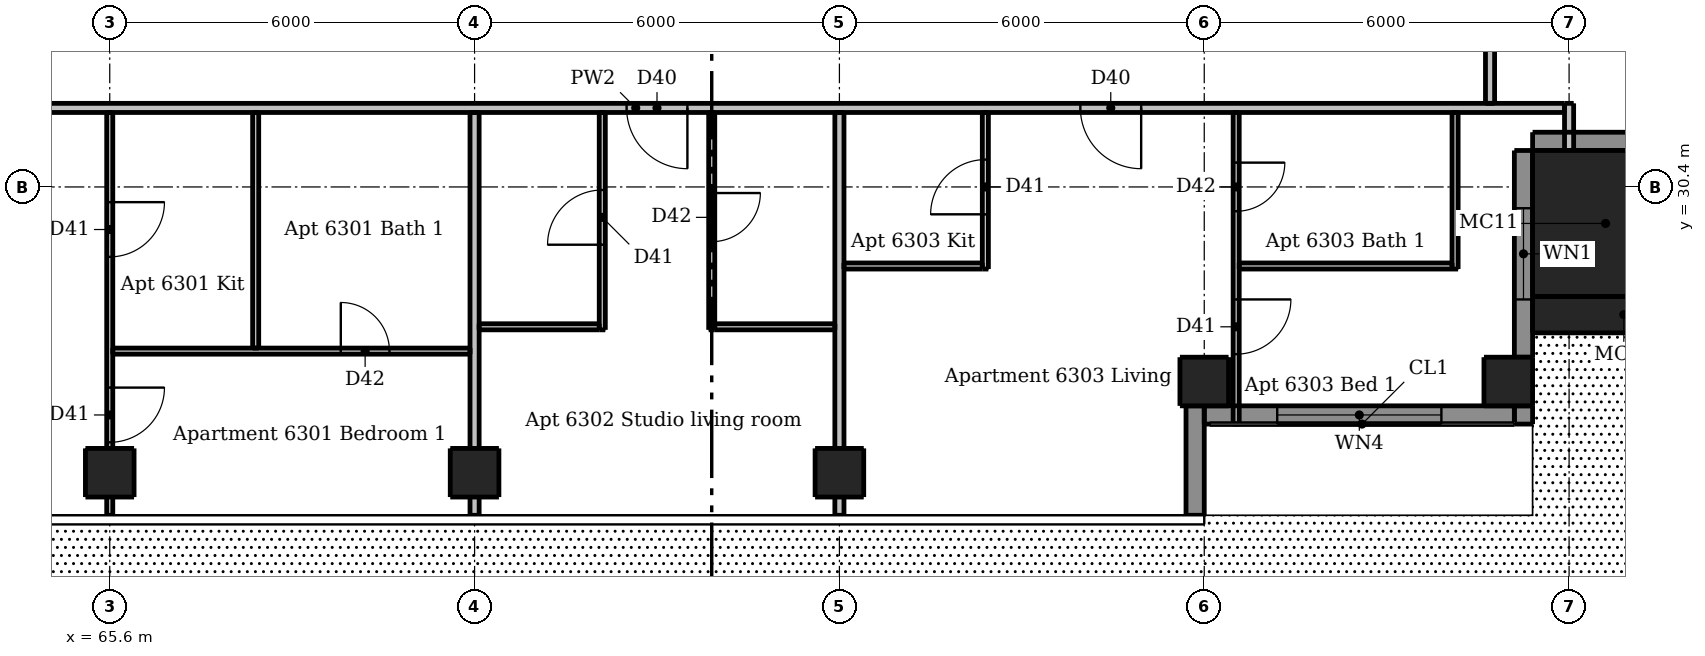
"""IFC4 building model, lengths in metres.
Left out: names, types, materials, properties, quantities, classifications, styles, units other than length and angle.
Written with IfcOpenShell. Run it as: python <this file> out.ifc"""

import sys

from ifc_helpers import new_model, si_unit, direction, frame, frame_2d, origin, origin_2d, place, context, subcontext, project, spatial, rectangle, extrude, element, fill, save


model = new_model("IFC4")
c1 = context("Model", 3, precision=1e-05, world=origin(), true_north=direction((0.0, 1.0)))
c2 = subcontext(c1, "Body", "Model", "MODEL_VIEW")
j1 = project(units=[si_unit("LENGTHUNIT", "METRE"), si_unit("PLANEANGLEUNIT", "RADIAN")], contexts=[c1])
p1 = place(None, origin())
s1 = spatial("IfcSite", under=j1, at=p1, CompositionType="ELEMENT")
p2 = place(p1, origin())
s2 = spatial("IfcBuilding", under=s1, at=p2, CompositionType="ELEMENT")
p3 = place(p2, frame((0.0, 0.0, 238.9)))
s3 = spatial("IfcBuildingStorey", under=s2, at=p3, CompositionType="ELEMENT", Elevation=238.9)
for number, where, z_axis, x_axis in (
    (1, (65.6, 25.7, 0.0), (0.0, 0.0, 1.0), (1.0, 0.0, 0.0)),
    (2, (71.6, 25.7, 0.0), (0.0, 0.0, 1.0), (1.0, 0.0, 0.0)),
    (3, (77.6, 25.7, 0.0), (0.0, 0.0, 1.0), (1.0, 0.0, 0.0)),
    (4, (83.6, 27.2, 0.0), (0.0, 0.0, 1.0), (1.0, 0.0, 0.0)),
    (5, (88.6, 27.2, 0.0), (0.0, 0.0, 1.0), (1.0, 0.0, 0.0)),
):
    element("IfcColumn", number, at=place(p3, frame(where, z_axis=z_axis, x_axis=x_axis)), inside=s3, PredefinedType="COLUMN", context=c2, shape_type="SweptSolid", body=[
        extrude(rectangle(XDim=0.8, YDim=0.8, at=origin_2d()), origin(), (0.0, 0.0, 1.0), 3.05),
    ])
p4 = place(p3, frame((90.5, 28.3, 0.0), z_axis=(0.0, 0.0, 1.0), x_axis=(1.0, 0.0, 0.0)))
e6 = element("IfcColumn", 6, at=p4, inside=s3, PredefinedType="COLUMN", context=c2, shape_type="SweptSolid", body=[
    extrude(rectangle(XDim=3.0, YDim=0.6, at=origin_2d()), origin(), (0.0, 0.0, 1.0), 2.4),
])
p5 = place(p3, frame((90.2, 29.8, 0.0), z_axis=(0.0, 0.0, 1.0), x_axis=(1.0, 0.0, 0.0)))
e7 = element("IfcColumn", 7, at=p5, inside=s3, PredefinedType="COLUMN", context=c2, shape_type="SweptSolid", body=[
    extrude(rectangle(XDim=2.4, YDim=2.4, at=origin_2d()), origin(), (0.0, 0.0, 1.0), 3.3),
])
p6 = place(p3, frame((83.45, 25.0, 0.0), z_axis=(0.0, 0.0, 1.0), x_axis=(0.0, 1.0, 0.0)))
e8 = element("IfcWall", 8, at=p6, inside=s3, PredefinedType="SOLIDWALL", context=c2, shape_type="SweptSolid", body=[
    extrude(rectangle(XDim=1.8, YDim=0.3, at=frame_2d((0.9, 0.0))), origin(), (0.0, 0.0, 1.0), 3.05),
])
p7 = place(p3, frame((88.85, 26.5, 0.0), z_axis=(0.0, 0.0, 1.0), x_axis=(0.0, 1.0, 0.0)))
e9 = element("IfcWall", 9, at=p7, inside=s3, PredefinedType="SOLIDWALL", context=c2, shape_type="SweptSolid", body=[
    extrude(rectangle(XDim=0.3, YDim=0.3, at=frame_2d((0.15, 0.0))), origin(), (0.0, 0.0, 1.0), 3.05),
])
p8 = place(p3, frame((88.85, 27.6, 0.0), z_axis=(0.0, 0.0, 1.0), x_axis=(0.0, 1.0, 0.0)))
e10 = element("IfcWall", 10, at=p8, inside=s3, PredefinedType="SOLIDWALL", context=c2, shape_type="SweptSolid", body=[
    extrude(rectangle(XDim=3.4, YDim=0.3, at=frame_2d((1.7, 0.0))), origin(), (0.0, 0.0, 1.0), 3.05),
])
p9 = place(p8, frame((0.95, 0.0, 0.9)))
e11 = element("IfcOpeningElement", 11, at=p9, cuts=e10, PredefinedType="OPENING", context=c2, shape_type="SweptSolid", body=[
    extrude(rectangle(XDim=1.5, YDim=1.5, at=frame_2d((0.75, 0.75))), frame((0.0, 0.16, 0.0), z_axis=(0.0, -1.0, 0.0), x_axis=(1.0, 0.0, 0.0)), (0.0, 0.0, 1.0), 0.32),
])
p10 = place(p3, frame((89.0, 31.15, 0.0), z_axis=(0.0, 0.0, 1.0), x_axis=(1.0, 0.0, 0.0)))
e12 = element("IfcWall", 12, at=p10, inside=s3, PredefinedType="SOLIDWALL", context=c2, shape_type="SweptSolid", body=[
    extrude(rectangle(XDim=3.4, YDim=0.3, at=frame_2d((1.7, 0.0))), origin(), (0.0, 0.0, 1.0), 3.05),
])
p11 = place(p3, frame((83.6, 26.65, 0.0), z_axis=(0.0, 0.0, 1.0), x_axis=(1.0, 0.0, 0.0)))
e13 = element("IfcWall", 13, at=p11, inside=s3, PredefinedType="SOLIDWALL", context=c2, shape_type="SweptSolid", body=[
    extrude(rectangle(XDim=5.1, YDim=0.3, at=frame_2d((2.55, 0.0))), origin(), (0.0, 0.0, 1.0), 3.05),
])
p12 = place(p11, frame((1.2, 0.0, 0.15)))
e14 = element("IfcOpeningElement", 14, at=p12, cuts=e13, PredefinedType="OPENING", context=c2, shape_type="SweptSolid", body=[
    extrude(rectangle(XDim=2.7, YDim=2.1, at=frame_2d((1.35, 1.05))), frame((0.0, 0.16, 0.0), z_axis=(0.0, -1.0, 0.0), x_axis=(1.0, 0.0, 0.0)), (0.0, 0.0, 1.0), 0.32),
])
p13 = place(p3, frame((65.6, 31.625, 0.0), z_axis=(0.0, 0.0, 1.0), x_axis=(0.0, -1.0, 0.0)))
e15 = element("IfcWall", 15, at=p13, inside=s3, PredefinedType="PARTITIONING", context=c2, shape_type="SweptSolid", body=[
    extrude(rectangle(XDim=6.625, YDim=0.1, at=frame_2d((3.312, 0.0))), origin(), (0.0, 0.0, 1.0), 2.59),
])
p14 = place(p13, frame((1.475, 0.0, 0.0)))
e16 = element("IfcOpeningElement", 16, at=p14, cuts=e15, PredefinedType="OPENING", context=c2, shape_type="SweptSolid", body=[
    extrude(rectangle(XDim=0.9, YDim=2.1, at=frame_2d((0.45, 1.05))), frame((0.0, 0.06, 0.0), z_axis=(0.0, -1.0, 0.0), x_axis=(1.0, 0.0, 0.0)), (0.0, 0.0, 1.0), 0.12),
])
p15 = place(p13, frame((4.525, 0.0, 0.0)))
e17 = element("IfcOpeningElement", 17, at=p15, cuts=e15, PredefinedType="OPENING", context=c2, shape_type="SweptSolid", body=[
    extrude(rectangle(XDim=0.9, YDim=2.1, at=frame_2d((0.45, 1.05))), frame((0.0, 0.06, 0.0), z_axis=(0.0, -1.0, 0.0), x_axis=(1.0, 0.0, 0.0)), (0.0, 0.0, 1.0), 0.12),
])
p16 = place(p3, frame((68.0, 27.75, 0.0), z_axis=(0.0, 0.0, 1.0), x_axis=(0.0, 1.0, 0.0)))
e18 = element("IfcWall", 18, at=p16, inside=s3, PredefinedType="PARTITIONING", context=c2, shape_type="SweptSolid", body=[
    extrude(rectangle(XDim=3.875, YDim=0.1, at=frame_2d((1.938, 0.0))), origin(), (0.0, 0.0, 1.0), 3.05),
])
p17 = place(p3, frame((73.7, 28.05, 0.0), z_axis=(0.0, 0.0, 1.0), x_axis=(0.0, 1.0, 0.0)))
e19 = element("IfcWall", 19, at=p17, inside=s3, PredefinedType="PARTITIONING", context=c2, shape_type="SweptSolid", body=[
    extrude(rectangle(XDim=3.575, YDim=0.1, at=frame_2d((1.788, 0.0))), origin(), (0.0, 0.0, 1.0), 3.05),
])
p18 = place(p17, frame((1.4, 0.0, 0.0)))
e20 = element("IfcOpeningElement", 20, at=p18, cuts=e19, PredefinedType="OPENING", context=c2, shape_type="SweptSolid", body=[
    extrude(rectangle(XDim=0.9, YDim=2.1, at=frame_2d((0.45, 1.05))), frame((0.0, 0.06, 0.0), z_axis=(0.0, -1.0, 0.0), x_axis=(1.0, 0.0, 0.0)), (0.0, 0.0, 1.0), 0.12),
])
p19 = place(p3, frame((75.5, 31.625, 0.0), z_axis=(0.0, 0.0, 1.0), x_axis=(0.0, -1.0, 0.0)))
e21 = element("IfcWall", 21, at=p19, inside=s3, PredefinedType="PARTITIONING", context=c2, shape_type="SweptSolid", body=[
    extrude(rectangle(XDim=3.575, YDim=0.1, at=frame_2d((1.788, 0.0))), origin(), (0.0, 0.0, 1.0), 3.05),
])
p20 = place(p19, frame((1.325, 0.0, 0.0)))
e22 = element("IfcOpeningElement", 22, at=p20, cuts=e21, PredefinedType="OPENING", context=c2, shape_type="SweptSolid", body=[
    extrude(rectangle(XDim=0.8, YDim=2.1, at=frame_2d((0.4, 1.05))), frame((0.0, 0.06, 0.0), z_axis=(0.0, -1.0, 0.0), x_axis=(1.0, 0.0, 0.0)), (0.0, 0.0, 1.0), 0.12),
])
p21 = place(p3, frame((80.0, 29.05, 0.0), z_axis=(0.0, 0.0, 1.0), x_axis=(0.0, 1.0, 0.0)))
e23 = element("IfcWall", 23, at=p21, inside=s3, PredefinedType="PARTITIONING", context=c2, shape_type="SweptSolid", body=[
    extrude(rectangle(XDim=2.575, YDim=0.1, at=frame_2d((1.288, 0.0))), origin(), (0.0, 0.0, 1.0), 3.05),
])
p22 = place(p21, frame((0.9, 0.0, 0.0)))
e24 = element("IfcOpeningElement", 24, at=p22, cuts=e23, PredefinedType="OPENING", context=c2, shape_type="SweptSolid", body=[
    extrude(rectangle(XDim=0.9, YDim=2.1, at=frame_2d((0.45, 1.05))), frame((0.0, 0.06, 0.0), z_axis=(0.0, -1.0, 0.0), x_axis=(1.0, 0.0, 0.0)), (0.0, 0.0, 1.0), 0.12),
])
p23 = place(p3, frame((84.125, 31.625, 0.0), z_axis=(0.0, 0.0, 1.0), x_axis=(0.0, -1.0, 0.0)))
e25 = element("IfcWall", 25, at=p23, inside=s3, PredefinedType="PARTITIONING", context=c2, shape_type="SweptSolid", body=[
    extrude(rectangle(XDim=5.125, YDim=0.1, at=frame_2d((2.562, 0.0))), origin(), (0.0, 0.0, 1.0), 3.05),
])
p24 = place(p23, frame((3.075, 0.0, 0.0)))
e26 = element("IfcOpeningElement", 26, at=p24, cuts=e25, PredefinedType="OPENING", context=c2, shape_type="SweptSolid", body=[
    extrude(rectangle(XDim=0.9, YDim=2.1, at=frame_2d((0.45, 1.05))), frame((0.0, 0.06, 0.0), z_axis=(0.0, -1.0, 0.0), x_axis=(1.0, 0.0, 0.0)), (0.0, 0.0, 1.0), 0.12),
])
p25 = place(p23, frame((0.825, 0.0, 0.0)))
e27 = element("IfcOpeningElement", 27, at=p25, cuts=e25, PredefinedType="OPENING", context=c2, shape_type="SweptSolid", body=[
    extrude(rectangle(XDim=0.8, YDim=2.1, at=frame_2d((0.4, 1.05))), frame((0.0, 0.06, 0.0), z_axis=(0.0, -1.0, 0.0), x_axis=(1.0, 0.0, 0.0)), (0.0, 0.0, 1.0), 0.12),
])
p26 = place(p3, frame((87.725, 29.05, 0.0), z_axis=(0.0, 0.0, 1.0), x_axis=(0.0, 1.0, 0.0)))
e28 = element("IfcWall", 28, at=p26, inside=s3, PredefinedType="PARTITIONING", context=c2, shape_type="SweptSolid", body=[
    extrude(rectangle(XDim=2.575, YDim=0.1, at=frame_2d((1.288, 0.0))), origin(), (0.0, 0.0, 1.0), 3.05),
])
p27 = place(p3, frame((77.675, 29.1, 0.0), z_axis=(0.0, 0.0, 1.0), x_axis=(1.0, 0.0, 0.0)))
e29 = element("IfcWall", 29, at=p27, inside=s3, PredefinedType="PARTITIONING", context=c2, shape_type="SweptSolid", body=[
    extrude(rectangle(XDim=2.275, YDim=0.1, at=frame_2d((1.137, 0.0))), origin(), (0.0, 0.0, 1.0), 3.05),
])
p28 = place(p3, frame((84.175, 29.1, 0.0), z_axis=(0.0, 0.0, 1.0), x_axis=(1.0, 0.0, 0.0)))
e30 = element("IfcWall", 30, at=p28, inside=s3, PredefinedType="PARTITIONING", context=c2, shape_type="SweptSolid", body=[
    extrude(rectangle(XDim=3.5, YDim=0.1, at=frame_2d((1.75, 0.0))), origin(), (0.0, 0.0, 1.0), 3.05),
])
for number, where, z_axis, x_axis in (
    (31, (71.675, 28.1, 0.0), (0.0, 0.0, 1.0), (1.0, 0.0, 0.0)),
    (32, (75.55, 28.1, 0.0), (0.0, 0.0, 1.0), (1.0, 0.0, 0.0)),
):
    element("IfcWall", number, at=place(p3, frame(where, z_axis=z_axis, x_axis=x_axis)), inside=s3, PredefinedType="PARTITIONING", context=c2, shape_type="SweptSolid", body=[
        extrude(rectangle(XDim=1.975, YDim=0.1, at=frame_2d((0.987, 0.0))), origin(), (0.0, 0.0, 1.0), 3.05),
    ])
p29 = place(p3, frame((65.65, 27.7, 0.0), z_axis=(0.0, 0.0, 1.0), x_axis=(1.0, 0.0, 0.0)))
e33 = element("IfcWall", 33, at=p29, inside=s3, PredefinedType="PARTITIONING", context=c2, shape_type="SweptSolid", body=[
    extrude(rectangle(XDim=5.875, YDim=0.1, at=frame_2d((2.938, 0.0))), origin(), (0.0, 0.0, 1.0), 3.05),
])
p30 = place(p29, frame((3.75, 0.0, 0.0)))
e34 = element("IfcOpeningElement", 34, at=p30, cuts=e33, PredefinedType="OPENING", context=c2, shape_type="SweptSolid", body=[
    extrude(rectangle(XDim=0.8, YDim=2.1, at=frame_2d((0.4, 1.05))), frame((0.0, 0.06, 0.0), z_axis=(0.0, -1.0, 0.0), x_axis=(1.0, 0.0, 0.0)), (0.0, 0.0, 1.0), 0.12),
])
for number, where, z_axis, x_axis in (
    (35, (71.6, 25.0, 0.0), (0.0, 0.0, 1.0), (0.0, 1.0, 0.0)),
    (36, (77.6, 25.0, 0.0), (0.0, 0.0, 1.0), (0.0, 1.0, 0.0)),
):
    element("IfcWall", number, at=place(p3, frame(where, z_axis=z_axis, x_axis=x_axis)), inside=s3, PredefinedType="PARTITIONING", context=c2, shape_type="SweptSolid", body=[
        extrude(rectangle(XDim=6.625, YDim=0.15, at=frame_2d((3.312, 0.0))), origin(), (0.0, 0.0, 1.0), 2.59),
    ])
p31 = place(p3, frame((88.3, 61.175, 0.0), z_axis=(0.0, 0.0, 1.0), x_axis=(0.0, -1.0, 0.0)))
e37 = element("IfcWall", 37, at=p31, inside=s3, PredefinedType="PARTITIONING", context=c2, shape_type="SweptSolid", body=[
    extrude(rectangle(XDim=29.4, YDim=0.15, at=frame_2d((14.7, 0.0))), origin(), (0.0, 0.0, 1.0), 3.05),
])
p32 = place(p31, frame((26.625, 0.0, 0.0)))
e38 = element("IfcOpeningElement", 38, at=p32, cuts=e37, PredefinedType="OPENING", context=c2, shape_type="SweptSolid", body=[
    extrude(rectangle(XDim=1.0, YDim=2.1, at=frame_2d((0.5, 1.05))), frame((0.0, 0.085, 0.0), z_axis=(0.0, -1.0, 0.0), x_axis=(1.0, 0.0, 0.0)), (0.0, 0.0, 1.0), 0.17),
])
p33 = place(p31, frame((15.275, 0.0, 0.0)))
e39 = element("IfcOpeningElement", 39, at=p33, cuts=e37, PredefinedType="OPENING", context=c2, shape_type="SweptSolid", body=[
    extrude(rectangle(XDim=1.0, YDim=2.1, at=frame_2d((0.5, 1.05))), frame((0.0, 0.085, 0.0), z_axis=(0.0, -1.0, 0.0), x_axis=(1.0, 0.0, 0.0)), (0.0, 0.0, 1.0), 0.17),
])
p34 = place(p31, frame((9.275, 0.0, 0.0)))
e40 = element("IfcOpeningElement", 40, at=p34, cuts=e37, PredefinedType="OPENING", context=c2, shape_type="SweptSolid", body=[
    extrude(rectangle(XDim=1.0, YDim=2.1, at=frame_2d((0.5, 1.05))), frame((0.0, 0.085, 0.0), z_axis=(0.0, -1.0, 0.0), x_axis=(1.0, 0.0, 0.0)), (0.0, 0.0, 1.0), 0.17),
])
p35 = place(p31, frame((3.275, 0.0, 0.0)))
e41 = element("IfcOpeningElement", 41, at=p35, cuts=e37, PredefinedType="OPENING", context=c2, shape_type="SweptSolid", body=[
    extrude(rectangle(XDim=1.0, YDim=2.1, at=frame_2d((0.5, 1.05))), frame((0.0, 0.085, 0.0), z_axis=(0.0, -1.0, 0.0), x_axis=(1.0, 0.0, 0.0)), (0.0, 0.0, 1.0), 0.17),
])
p36 = place(p3, frame((89.6, 31.0, 0.0), z_axis=(0.0, 0.0, 1.0), x_axis=(0.0, 1.0, 0.0)))
e42 = element("IfcWall", 42, at=p36, inside=s3, PredefinedType="PARTITIONING", context=c2, shape_type="SweptSolid", body=[
    extrude(rectangle(XDim=0.775, YDim=0.15, at=frame_2d((0.387, 0.0))), origin(), (0.0, 0.0, 1.0), 3.05),
])
p37 = place(p3, frame((89.525, 31.7, 0.0), z_axis=(0.0, 0.0, 1.0), x_axis=(-1.0, 0.0, 0.0)))
e43 = element("IfcWall", 43, at=p37, inside=s3, PredefinedType="PARTITIONING", context=c2, shape_type="SweptSolid", body=[
    extrude(rectangle(XDim=30.55, YDim=0.15, at=frame_2d((15.275, 0.0))), origin(), (0.0, 0.0, 1.0), 3.05),
])
p38 = place(p37, frame((26.775, 0.0, 0.0)))
e44 = element("IfcOpeningElement", 44, at=p38, cuts=e43, PredefinedType="OPENING", context=c2, shape_type="SweptSolid", body=[
    extrude(rectangle(XDim=1.0, YDim=2.1, at=frame_2d((0.5, 1.05))), frame((0.0, 0.085, 0.0), z_axis=(0.0, -1.0, 0.0), x_axis=(1.0, 0.0, 0.0)), (0.0, 0.0, 1.0), 0.17),
])
p39 = place(p37, frame((14.425, 0.0, 0.0)))
e45 = element("IfcOpeningElement", 45, at=p39, cuts=e43, PredefinedType="OPENING", context=c2, shape_type="SweptSolid", body=[
    extrude(rectangle(XDim=1.0, YDim=2.1, at=frame_2d((0.5, 1.05))), frame((0.0, 0.085, 0.0), z_axis=(0.0, -1.0, 0.0), x_axis=(1.0, 0.0, 0.0)), (0.0, 0.0, 1.0), 0.17),
])
p40 = place(p37, frame((6.962, 0.0, 0.0)))
e46 = element("IfcOpeningElement", 46, at=p40, cuts=e43, PredefinedType="OPENING", context=c2, shape_type="SweptSolid", body=[
    extrude(rectangle(XDim=1.0, YDim=2.1, at=frame_2d((0.5, 1.05))), frame((0.0, 0.085, 0.0), z_axis=(0.0, -1.0, 0.0), x_axis=(1.0, 0.0, 0.0)), (0.0, 0.0, 1.0), 0.17),
])
p41 = place(p9, origin())
e47 = element("IfcWindow", 47, at=p41, inside=s3, PartitioningType="DOUBLE_PANEL_VERTICAL", PredefinedType="WINDOW", context=c2, shape_type="SweptSolid", body=[
    extrude(rectangle(XDim=1.5, YDim=1.5, at=frame_2d((0.75, 0.75))), frame((0.0, 0.03, 0.0), z_axis=(0.0, -1.0, 0.0), x_axis=(1.0, 0.0, 0.0)), (0.0, 0.0, 1.0), 0.06),
])
fill(e11, e47)
p42 = place(p12, origin())
e48 = element("IfcWindow", 48, at=p42, inside=s3, PartitioningType="DOUBLE_PANEL_VERTICAL", PredefinedType="WINDOW", context=c2, shape_type="SweptSolid", body=[
    extrude(rectangle(XDim=2.7, YDim=2.1, at=frame_2d((1.35, 1.05))), frame((0.0, 0.03, 0.0), z_axis=(0.0, -1.0, 0.0), x_axis=(1.0, 0.0, 0.0)), (0.0, 0.0, 1.0), 0.06),
])
fill(e14, e48)
p43 = place(p14, origin())
e49 = element("IfcDoor", 49, at=p43, inside=s3, OperationType="SINGLE_SWING_LEFT", PredefinedType="DOOR", context=c2, shape_type="SweptSolid", body=[
    extrude(rectangle(XDim=0.9, YDim=2.1, at=frame_2d((0.45, 1.05))), frame((0.0, 0.025, 0.0), z_axis=(0.0, -1.0, 0.0), x_axis=(1.0, 0.0, 0.0)), (0.0, 0.0, 1.0), 0.05),
])
fill(e16, e49)
p44 = place(p15, origin())
e50 = element("IfcDoor", 50, at=p44, inside=s3, OperationType="SINGLE_SWING_LEFT", PredefinedType="DOOR", context=c2, shape_type="SweptSolid", body=[
    extrude(rectangle(XDim=0.9, YDim=2.1, at=frame_2d((0.45, 1.05))), frame((0.0, 0.025, 0.0), z_axis=(0.0, -1.0, 0.0), x_axis=(1.0, 0.0, 0.0)), (0.0, 0.0, 1.0), 0.05),
])
fill(e17, e50)
p45 = place(p30, origin())
e51 = element("IfcDoor", 51, at=p45, inside=s3, OperationType="SINGLE_SWING_LEFT", PredefinedType="DOOR", context=c2, shape_type="SweptSolid", body=[
    extrude(rectangle(XDim=0.8, YDim=2.1, at=frame_2d((0.4, 1.05))), frame((0.0, 0.025, 0.0), z_axis=(0.0, -1.0, 0.0), x_axis=(1.0, 0.0, 0.0)), (0.0, 0.0, 1.0), 0.05),
])
fill(e34, e51)
p46 = place(p39, origin())
e52 = element("IfcDoor", 52, at=p46, inside=s3, OperationType="SINGLE_SWING_LEFT", PredefinedType="DOOR", context=c2, shape_type="SweptSolid", body=[
    extrude(rectangle(XDim=1.0, YDim=2.1, at=frame_2d((0.5, 1.05))), frame((0.0, 0.025, 0.0), z_axis=(0.0, -1.0, 0.0), x_axis=(1.0, 0.0, 0.0)), (0.0, 0.0, 1.0), 0.05),
])
fill(e45, e52)
p47 = place(p18, origin())
e53 = element("IfcDoor", 53, at=p47, inside=s3, OperationType="SINGLE_SWING_LEFT", PredefinedType="DOOR", context=c2, shape_type="SweptSolid", body=[
    extrude(rectangle(XDim=0.9, YDim=2.1, at=frame_2d((0.45, 1.05))), frame((0.0, 0.025, 0.0), z_axis=(0.0, -1.0, 0.0), x_axis=(1.0, 0.0, 0.0)), (0.0, 0.0, 1.0), 0.05),
])
fill(e20, e53)
p48 = place(p20, origin())
e54 = element("IfcDoor", 54, at=p48, inside=s3, OperationType="SINGLE_SWING_LEFT", PredefinedType="DOOR", context=c2, shape_type="SweptSolid", body=[
    extrude(rectangle(XDim=0.8, YDim=2.1, at=frame_2d((0.4, 1.05))), frame((0.0, 0.025, 0.0), z_axis=(0.0, -1.0, 0.0), x_axis=(1.0, 0.0, 0.0)), (0.0, 0.0, 1.0), 0.05),
])
fill(e22, e54)
p49 = place(p40, origin())
e55 = element("IfcDoor", 55, at=p49, inside=s3, OperationType="SINGLE_SWING_LEFT", PredefinedType="DOOR", context=c2, shape_type="SweptSolid", body=[
    extrude(rectangle(XDim=1.0, YDim=2.1, at=frame_2d((0.5, 1.05))), frame((0.0, 0.025, 0.0), z_axis=(0.0, -1.0, 0.0), x_axis=(1.0, 0.0, 0.0)), (0.0, 0.0, 1.0), 0.05),
])
fill(e46, e55)
p50 = place(p22, origin())
e56 = element("IfcDoor", 56, at=p50, inside=s3, OperationType="SINGLE_SWING_LEFT", PredefinedType="DOOR", context=c2, shape_type="SweptSolid", body=[
    extrude(rectangle(XDim=0.9, YDim=2.1, at=frame_2d((0.45, 1.05))), frame((0.0, 0.025, 0.0), z_axis=(0.0, -1.0, 0.0), x_axis=(1.0, 0.0, 0.0)), (0.0, 0.0, 1.0), 0.05),
])
fill(e24, e56)
p51 = place(p24, origin())
e57 = element("IfcDoor", 57, at=p51, inside=s3, OperationType="SINGLE_SWING_LEFT", PredefinedType="DOOR", context=c2, shape_type="SweptSolid", body=[
    extrude(rectangle(XDim=0.9, YDim=2.1, at=frame_2d((0.45, 1.05))), frame((0.0, 0.025, 0.0), z_axis=(0.0, -1.0, 0.0), x_axis=(1.0, 0.0, 0.0)), (0.0, 0.0, 1.0), 0.05),
])
fill(e26, e57)
p52 = place(p25, origin())
e58 = element("IfcDoor", 58, at=p52, inside=s3, OperationType="SINGLE_SWING_LEFT", PredefinedType="DOOR", context=c2, shape_type="SweptSolid", body=[
    extrude(rectangle(XDim=0.8, YDim=2.1, at=frame_2d((0.4, 1.05))), frame((0.0, 0.025, 0.0), z_axis=(0.0, -1.0, 0.0), x_axis=(1.0, 0.0, 0.0)), (0.0, 0.0, 1.0), 0.05),
])
fill(e27, e58)
save(model, sys.argv[1])
